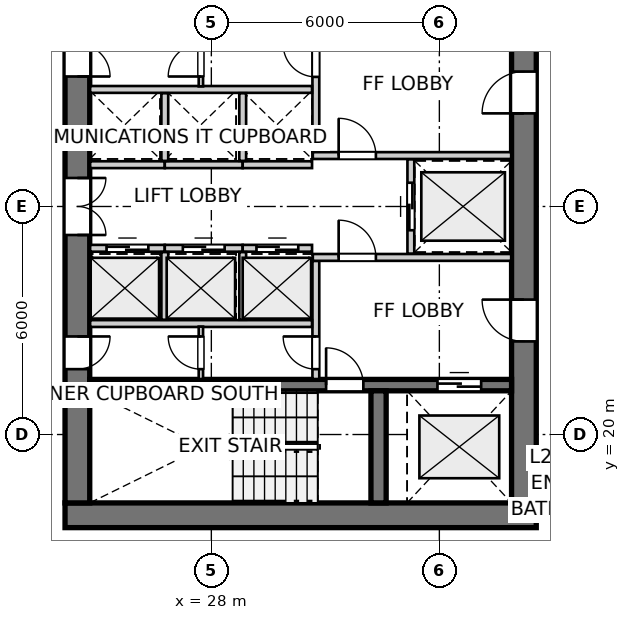
"""IFC4 building model, lengths in metres.
Left out: names, types, materials, properties, quantities, classifications, styles, units other than length and angle.
Written with IfcOpenShell. Run it as: python <this file> out.ifc"""

import sys

from ifc_helpers import new_model, si_unit, direction, frame, frame_2d, origin, place, context, subcontext, project, spatial, rectangle, extrude, source, transform, mapped, element, fill, save


model = new_model("IFC4")
c1 = context("Model", 3, precision=1e-05, world=origin(), true_north=direction((0.0, 1.0)))
c2 = subcontext(c1, "Body", "Model", "MODEL_VIEW")
j1 = project(units=[si_unit("LENGTHUNIT", "METRE"), si_unit("PLANEANGLEUNIT", "RADIAN")], contexts=[c1])
p1 = place(None, origin())
s1 = spatial("IfcSite", under=j1, at=p1, CompositionType="ELEMENT")
p2 = place(p1, origin())
s2 = spatial("IfcBuilding", under=s1, at=p2, CompositionType="ELEMENT")
p3 = place(p2, frame((0.0, 0.0, 80.0)))
s3 = spatial("IfcBuildingStorey", under=s2, at=p3, CompositionType="ELEMENT", Elevation=80.0)
p4 = place(p3, frame((24.15, 17.875, 0.0), z_axis=(0.0, 0.0, 1.0), x_axis=(1.0, 0.0, 0.0)))
e1 = element("IfcWall", 1, at=p4, inside=s3, PredefinedType="SHEAR", context=c2, shape_type="SweptSolid", body=[
    extrude(rectangle(XDim=12.4, YDim=0.65, at=frame_2d((6.2, 0.0))), origin(), (0.0, 0.0, 1.0), 2.935),
])
p5 = place(p3, frame((24.475, 33.8, 0.0), z_axis=(0.0, 0.0, 1.0), x_axis=(0.0, -1.0, 0.0)))
e2 = element("IfcWall", 2, at=p5, inside=s3, PredefinedType="SHEAR", context=c2, shape_type="SweptSolid", body=[
    extrude(rectangle(XDim=15.6, YDim=0.65, at=frame_2d((7.8, 0.0))), origin(), (0.0, 0.0, 1.0), 2.935),
])
p6 = place(p5, frame((7.05, 0.0, 0.0)))
e3 = element("IfcOpeningElement", 3, at=p6, cuts=e2, PredefinedType="OPENING", context=c2, shape_type="SweptSolid", body=[
    extrude(rectangle(XDim=1.5, YDim=2.15, at=frame_2d((0.75, 1.075))), frame((0.0, 0.335, 0.0), z_axis=(0.0, -1.0, 0.0), x_axis=(1.0, 0.0, 0.0)), (0.0, 0.0, 1.0), 0.67),
])
p7 = place(p5, frame((3.52, 0.0, 0.0)))
e4 = element("IfcOpeningElement", 4, at=p7, cuts=e2, PredefinedType="OPENING", context=c2, shape_type="SweptSolid", body=[
    extrude(rectangle(XDim=0.86, YDim=2.05, at=frame_2d((0.43, 1.025))), frame((0.0, 0.335, 0.0), z_axis=(0.0, -1.0, 0.0), x_axis=(1.0, 0.0, 0.0)), (0.0, 0.0, 1.0), 0.67),
])
p8 = place(p5, frame((11.22, 0.0, 0.0)))
e5 = element("IfcOpeningElement", 5, at=p8, cuts=e2, PredefinedType="OPENING", context=c2, shape_type="SweptSolid", body=[
    extrude(rectangle(XDim=0.86, YDim=2.05, at=frame_2d((0.43, 1.025))), frame((0.0, 0.335, 0.0), z_axis=(0.0, -1.0, 0.0), x_axis=(1.0, 0.0, 0.0)), (0.0, 0.0, 1.0), 0.67),
])
p9 = place(p3, frame((36.225, 18.2, 0.0), z_axis=(0.0, 0.0, 1.0), x_axis=(0.0, 1.0, 0.0)))
e6 = element("IfcWall", 6, at=p9, inside=s3, PredefinedType="SHEAR", context=c2, shape_type="SweptSolid", body=[
    extrude(rectangle(XDim=15.6, YDim=0.65, at=frame_2d((7.8, 0.0))), origin(), (0.0, 0.0, 1.0), 2.935),
])
p10 = place(p9, frame((4.25, 0.0, 0.0)))
e7 = element("IfcOpeningElement", 7, at=p10, cuts=e6, PredefinedType="OPENING", context=c2, shape_type="SweptSolid", body=[
    extrude(rectangle(XDim=1.1, YDim=2.15, at=frame_2d((0.55, 1.075))), frame((0.0, 0.335, 0.0), z_axis=(0.0, -1.0, 0.0), x_axis=(1.0, 0.0, 0.0)), (0.0, 0.0, 1.0), 0.67),
])
p11 = place(p9, frame((10.25, 0.0, 0.0)))
e8 = element("IfcOpeningElement", 8, at=p11, cuts=e6, PredefinedType="OPENING", context=c2, shape_type="SweptSolid", body=[
    extrude(rectangle(XDim=1.1, YDim=2.15, at=frame_2d((0.55, 1.075))), frame((0.0, 0.335, 0.0), z_axis=(0.0, -1.0, 0.0), x_axis=(1.0, 0.0, 0.0)), (0.0, 0.0, 1.0), 0.67),
])
p12 = place(p3, frame((24.8, 21.3, 0.0), z_axis=(0.0, 0.0, 1.0), x_axis=(1.0, 0.0, 0.0)))
e9 = element("IfcWall", 9, at=p12, inside=s3, PredefinedType="SHEAR", context=c2, shape_type="SweptSolid", body=[
    extrude(rectangle(XDim=11.1, YDim=0.3, at=frame_2d((5.55, 0.0))), origin(), (0.0, 0.0, 1.0), 2.935),
])
p13 = place(p12, frame((6.22, 0.0, 0.0)))
e10 = element("IfcOpeningElement", 10, at=p13, cuts=e9, PredefinedType="OPENING", context=c2, shape_type="SweptSolid", body=[
    extrude(rectangle(XDim=0.98, YDim=2.15, at=frame_2d((0.49, 1.075))), frame((0.0, 0.16, 0.0), z_axis=(0.0, -1.0, 0.0), x_axis=(1.0, 0.0, 0.0)), (0.0, 0.0, 1.0), 0.32),
])
p14 = place(p12, frame((9.15, 0.0, 0.0)))
e11 = element("IfcOpeningElement", 11, at=p14, cuts=e9, PredefinedType="OPENING", context=c2, shape_type="SweptSolid", body=[
    extrude(rectangle(XDim=1.15, YDim=2.15, at=frame_2d((0.575, 1.075))), frame((0.0, 0.16, 0.0), z_axis=(0.0, -1.0, 0.0), x_axis=(1.0, 0.0, 0.0)), (0.0, 0.0, 1.0), 0.32),
])
p15 = place(p3, frame((32.4, 18.2, 0.0), z_axis=(0.0, 0.0, 1.0), x_axis=(0.0, 1.0, 0.0)))
e12 = element("IfcWall", 12, at=p15, inside=s3, PredefinedType="SHEAR", context=c2, shape_type="SweptSolid", body=[
    extrude(rectangle(XDim=2.95, YDim=0.4, at=frame_2d((1.475, 0.0))), origin(), (0.0, 0.0, 1.0), 2.935),
])
p16 = place(p3, frame((30.75, 21.46, 0.0), z_axis=(0.0, 0.0, 1.0), x_axis=(0.0, 1.0, 0.0)))
e13 = element("IfcWall", 13, at=p16, inside=s3, PredefinedType="PARTITIONING", context=c2, shape_type="SweptSolid", body=[
    extrude(rectangle(XDim=3.11, YDim=0.18, at=frame_2d((1.555, 0.0))), origin(), (0.0, 0.0, 1.0), 2.935),
])
p17 = place(p16, frame((0.26, 0.0, 0.0)))
e14 = element("IfcOpeningElement", 14, at=p17, cuts=e13, PredefinedType="OPENING", context=c2, shape_type="SweptSolid", body=[
    extrude(rectangle(XDim=0.86, YDim=2.05, at=frame_2d((0.43, 1.025))), frame((0.0, 0.1, 0.0), z_axis=(0.0, -1.0, 0.0), x_axis=(1.0, 0.0, 0.0)), (0.0, 0.0, 1.0), 0.2),
])
p18 = place(p3, frame((30.67, 24.66, 0.0), z_axis=(0.0, 0.0, 1.0), x_axis=(1.0, 0.0, 0.0)))
e15 = element("IfcWall", 15, at=p18, inside=s3, PredefinedType="PARTITIONING", context=c2, shape_type="SweptSolid", body=[
    extrude(rectangle(XDim=5.22, YDim=0.18, at=frame_2d((2.61, 0.0))), origin(), (0.0, 0.0, 1.0), 2.935),
])
p19 = place(p18, frame((0.68, 0.0, 0.0)))
e16 = element("IfcOpeningElement", 16, at=p19, cuts=e15, PredefinedType="OPENING", context=c2, shape_type="SweptSolid", body=[
    extrude(rectangle(XDim=0.98, YDim=2.15, at=frame_2d((0.49, 1.075))), frame((0.0, 0.1, 0.0), z_axis=(0.0, -1.0, 0.0), x_axis=(1.0, 0.0, 0.0)), (0.0, 0.0, 1.0), 0.2),
])
p20 = place(p3, frame((30.75, 27.43, 0.0), z_axis=(0.0, 0.0, 1.0), x_axis=(0.0, 1.0, 0.0)))
e17 = element("IfcWall", 17, at=p20, inside=s3, PredefinedType="PARTITIONING", context=c2, shape_type="SweptSolid", body=[
    extrude(rectangle(XDim=3.11, YDim=0.18, at=frame_2d((1.555, 0.0))), origin(), (0.0, 0.0, 1.0), 2.935),
])
p21 = place(p20, frame((1.98, 0.0, 0.0)))
e18 = element("IfcOpeningElement", 18, at=p21, cuts=e17, PredefinedType="OPENING", context=c2, shape_type="SweptSolid", body=[
    extrude(rectangle(XDim=0.86, YDim=2.05, at=frame_2d((0.43, 1.025))), frame((0.0, 0.1, 0.0), z_axis=(0.0, -1.0, 0.0), x_axis=(1.0, 0.0, 0.0)), (0.0, 0.0, 1.0), 0.2),
])
p22 = place(p3, frame((30.67, 27.34, 0.0), z_axis=(0.0, 0.0, 1.0), x_axis=(1.0, 0.0, 0.0)))
e19 = element("IfcWall", 19, at=p22, inside=s3, PredefinedType="PARTITIONING", context=c2, shape_type="SweptSolid", body=[
    extrude(rectangle(XDim=5.22, YDim=0.18, at=frame_2d((2.61, 0.0))), origin(), (0.0, 0.0, 1.0), 2.935),
])
p23 = place(p22, frame((0.68, 0.0, 0.0)))
e20 = element("IfcOpeningElement", 20, at=p23, cuts=e19, PredefinedType="OPENING", context=c2, shape_type="SweptSolid", body=[
    extrude(rectangle(XDim=0.98, YDim=2.15, at=frame_2d((0.49, 1.075))), frame((0.0, 0.1, 0.0), z_axis=(0.0, -1.0, 0.0), x_axis=(1.0, 0.0, 0.0)), (0.0, 0.0, 1.0), 0.2),
])
p24 = place(p3, frame((33.25, 24.76, 0.0), z_axis=(0.0, 0.0, 1.0), x_axis=(0.0, 1.0, 0.0)))
e21 = element("IfcWall", 21, at=p24, inside=s3, PredefinedType="PARTITIONING", context=c2, shape_type="SweptSolid", body=[
    extrude(rectangle(XDim=2.48, YDim=0.18, at=frame_2d((1.24, 0.0))), origin(), (0.0, 0.0, 1.0), 2.935),
])
p25 = place(p24, frame((0.615, 0.0, 0.0)))
e22 = element("IfcOpeningElement", 22, at=p25, cuts=e21, PredefinedType="OPENING", context=c2, shape_type="SweptSolid", body=[
    extrude(rectangle(XDim=1.25, YDim=2.15, at=frame_2d((0.625, 1.075))), frame((0.0, 0.1, 0.0), z_axis=(0.0, -1.0, 0.0), x_axis=(1.0, 0.0, 0.0)), (0.0, 0.0, 1.0), 0.2),
])
p26 = place(p3, frame((24.81, 22.92, 0.0), z_axis=(0.0, 0.0, 1.0), x_axis=(1.0, 0.0, 0.0)))
e23 = element("IfcWall", 23, at=p26, inside=s3, PredefinedType="PARTITIONING", context=c2, shape_type="SweptSolid", body=[
    extrude(rectangle(XDim=5.84, YDim=0.18, at=frame_2d((2.92, 0.0))), origin(), (0.0, 0.0, 1.0), 2.935),
])
p27 = place(p3, frame((24.81, 24.9, 0.0), z_axis=(0.0, 0.0, 1.0), x_axis=(1.0, 0.0, 0.0)))
e24 = element("IfcWall", 24, at=p27, inside=s3, PredefinedType="PARTITIONING", context=c2, shape_type="SweptSolid", body=[
    extrude(rectangle(XDim=1.965, YDim=0.18, at=frame_2d((0.982, 0.0))), origin(), (0.0, 0.0, 1.0), 2.935),
])
p28 = place(p27, frame((0.433, 0.0, 0.0)))
e25 = element("IfcOpeningElement", 25, at=p28, cuts=e24, PredefinedType="OPENING", context=c2, shape_type="SweptSolid", body=[
    extrude(rectangle(XDim=1.1, YDim=2.15, at=frame_2d((0.55, 1.075))), frame((0.0, 0.1, 0.0), z_axis=(0.0, -1.0, 0.0), x_axis=(1.0, 0.0, 0.0)), (0.0, 0.0, 1.0), 0.2),
])
p29 = place(p3, frame((26.775, 24.9, 0.0), z_axis=(0.0, 0.0, 1.0), x_axis=(1.0, 0.0, 0.0)))
e26 = element("IfcWall", 26, at=p29, inside=s3, PredefinedType="PARTITIONING", context=c2, shape_type="SweptSolid", body=[
    extrude(rectangle(XDim=2.05, YDim=0.18, at=frame_2d((1.025, 0.0))), origin(), (0.0, 0.0, 1.0), 2.935),
])
p30 = place(p29, frame((0.475, 0.0, 0.0)))
e27 = element("IfcOpeningElement", 27, at=p30, cuts=e26, PredefinedType="OPENING", context=c2, shape_type="SweptSolid", body=[
    extrude(rectangle(XDim=1.1, YDim=2.15, at=frame_2d((0.55, 1.075))), frame((0.0, 0.1, 0.0), z_axis=(0.0, -1.0, 0.0), x_axis=(1.0, 0.0, 0.0)), (0.0, 0.0, 1.0), 0.2),
])
p31 = place(p3, frame((26.775, 23.02, 0.0), z_axis=(0.0, 0.0, 1.0), x_axis=(0.0, 1.0, 0.0)))
e28 = element("IfcWall", 28, at=p31, inside=s3, PredefinedType="PARTITIONING", context=c2, shape_type="SweptSolid", body=[
    extrude(rectangle(XDim=1.78, YDim=0.18, at=frame_2d((0.89, 0.0))), origin(), (0.0, 0.0, 1.0), 2.935),
])
p32 = place(p3, frame((28.825, 24.9, 0.0), z_axis=(0.0, 0.0, 1.0), x_axis=(1.0, 0.0, 0.0)))
e29 = element("IfcWall", 29, at=p32, inside=s3, PredefinedType="PARTITIONING", context=c2, shape_type="SweptSolid", body=[
    extrude(rectangle(XDim=1.825, YDim=0.18, at=frame_2d((0.913, 0.0))), origin(), (0.0, 0.0, 1.0), 2.935),
])
p33 = place(p32, frame((0.363, 0.0, 0.0)))
e30 = element("IfcOpeningElement", 30, at=p33, cuts=e29, PredefinedType="OPENING", context=c2, shape_type="SweptSolid", body=[
    extrude(rectangle(XDim=1.1, YDim=2.15, at=frame_2d((0.55, 1.075))), frame((0.0, 0.1, 0.0), z_axis=(0.0, -1.0, 0.0), x_axis=(1.0, 0.0, 0.0)), (0.0, 0.0, 1.0), 0.2),
])
p34 = place(p3, frame((28.825, 23.02, 0.0), z_axis=(0.0, 0.0, 1.0), x_axis=(0.0, 1.0, 0.0)))
e31 = element("IfcWall", 31, at=p34, inside=s3, PredefinedType="PARTITIONING", context=c2, shape_type="SweptSolid", body=[
    extrude(rectangle(XDim=1.78, YDim=0.18, at=frame_2d((0.89, 0.0))), origin(), (0.0, 0.0, 1.0), 2.935),
])
p35 = place(p3, frame((24.81, 29.08, 0.0), z_axis=(0.0, 0.0, 1.0), x_axis=(1.0, 0.0, 0.0)))
e32 = element("IfcWall", 32, at=p35, inside=s3, PredefinedType="PARTITIONING", context=c2, shape_type="SweptSolid", body=[
    extrude(rectangle(XDim=5.84, YDim=0.18, at=frame_2d((2.92, 0.0))), origin(), (0.0, 0.0, 1.0), 2.935),
])
p36 = place(p3, frame((24.81, 27.1, 0.0), z_axis=(0.0, 0.0, 1.0), x_axis=(1.0, 0.0, 0.0)))
e33 = element("IfcWall", 33, at=p36, inside=s3, PredefinedType="PARTITIONING", context=c2, shape_type="SweptSolid", body=[
    extrude(rectangle(XDim=1.965, YDim=0.18, at=frame_2d((0.982, 0.0))), origin(), (0.0, 0.0, 1.0), 2.935),
])
p37 = place(p3, frame((26.775, 27.1, 0.0), z_axis=(0.0, 0.0, 1.0), x_axis=(1.0, 0.0, 0.0)))
e34 = element("IfcWall", 34, at=p37, inside=s3, PredefinedType="PARTITIONING", context=c2, shape_type="SweptSolid", body=[
    extrude(rectangle(XDim=2.05, YDim=0.18, at=frame_2d((1.025, 0.0))), origin(), (0.0, 0.0, 1.0), 2.935),
])
p38 = place(p3, frame((26.775, 27.2, 0.0), z_axis=(0.0, 0.0, 1.0), x_axis=(0.0, 1.0, 0.0)))
e35 = element("IfcWall", 35, at=p38, inside=s3, PredefinedType="PARTITIONING", context=c2, shape_type="SweptSolid", body=[
    extrude(rectangle(XDim=1.78, YDim=0.18, at=frame_2d((0.89, 0.0))), origin(), (0.0, 0.0, 1.0), 2.935),
])
p39 = place(p3, frame((28.825, 27.1, 0.0), z_axis=(0.0, 0.0, 1.0), x_axis=(1.0, 0.0, 0.0)))
e36 = element("IfcWall", 36, at=p39, inside=s3, PredefinedType="PARTITIONING", context=c2, shape_type="SweptSolid", body=[
    extrude(rectangle(XDim=1.825, YDim=0.18, at=frame_2d((0.913, 0.0))), origin(), (0.0, 0.0, 1.0), 2.935),
])
p40 = place(p3, frame((28.825, 27.2, 0.0), z_axis=(0.0, 0.0, 1.0), x_axis=(0.0, 1.0, 0.0)))
e37 = element("IfcWall", 37, at=p40, inside=s3, PredefinedType="PARTITIONING", context=c2, shape_type="SweptSolid", body=[
    extrude(rectangle(XDim=1.78, YDim=0.18, at=frame_2d((0.89, 0.0))), origin(), (0.0, 0.0, 1.0), 2.935),
])
p41 = place(p3, frame((27.725, 21.46, 0.0), z_axis=(0.0, 0.0, 1.0), x_axis=(0.0, 1.0, 0.0)))
e38 = element("IfcWall", 38, at=p41, inside=s3, PredefinedType="PARTITIONING", context=c2, shape_type="SweptSolid", body=[
    extrude(rectangle(XDim=1.38, YDim=0.115, at=frame_2d((0.69, 0.0))), origin(), (0.0, 0.0, 1.0), 2.935),
])
p42 = place(p41, frame((0.26, 0.0, 0.0)))
e39 = element("IfcOpeningElement", 39, at=p42, cuts=e38, PredefinedType="OPENING", context=c2, shape_type="SweptSolid", body=[
    extrude(rectangle(XDim=0.86, YDim=2.05, at=frame_2d((0.43, 1.025))), frame((0.0, 0.067, 0.0), z_axis=(0.0, -1.0, 0.0), x_axis=(1.0, 0.0, 0.0)), (0.0, 0.0, 1.0), 0.135),
])
p43 = place(p3, frame((27.725, 29.16, 0.0), z_axis=(0.0, 0.0, 1.0), x_axis=(0.0, 1.0, 0.0)))
e40 = element("IfcWall", 40, at=p43, inside=s3, PredefinedType="PARTITIONING", context=c2, shape_type="SweptSolid", body=[
    extrude(rectangle(XDim=1.38, YDim=0.115, at=frame_2d((0.69, 0.0))), origin(), (0.0, 0.0, 1.0), 2.935),
])
p44 = place(p43, frame((0.26, 0.0, 0.0)))
e41 = element("IfcOpeningElement", 41, at=p44, cuts=e40, PredefinedType="OPENING", context=c2, shape_type="SweptSolid", body=[
    extrude(rectangle(XDim=0.86, YDim=2.05, at=frame_2d((0.43, 1.025))), frame((0.0, 0.067, 0.0), z_axis=(0.0, -1.0, 0.0), x_axis=(1.0, 0.0, 0.0)), (0.0, 0.0, 1.0), 0.135),
])
m1 = source(origin(), c2, "Body", "SweptSolid", [
    extrude(rectangle(XDim=0.98, YDim=2.15, at=frame_2d((0.49, 1.075))), frame((0.0, 0.025, 0.0), z_axis=(0.0, -1.0, 0.0), x_axis=(1.0, 0.0, 0.0)), (0.0, 0.0, 1.0), 0.05),
])
p45 = place(p13, origin())
e42 = element("IfcDoor", 42, at=p45, inside=s3, OperationType="SINGLE_SWING_LEFT", PredefinedType="DOOR", context=c2, shape_type="MappedRepresentation", body=[
    mapped(m1, transform((0.0, 0.0, 0.0), x_axis=(1.0, 0.0, 0.0), y_axis=(0.0, 1.0, 0.0), z_axis=(0.0, 0.0, 1.0), scale=1.0)),
])
fill(e10, e42)
m2 = source(origin(), c2, "Body", "SweptSolid", [
    extrude(rectangle(XDim=1.15, YDim=2.15, at=frame_2d((0.575, 1.075))), frame((0.0, 0.025, 0.0), z_axis=(0.0, -1.0, 0.0), x_axis=(1.0, 0.0, 0.0)), (0.0, 0.0, 1.0), 0.05),
])
p46 = place(p14, origin())
e43 = element("IfcDoor", 43, at=p46, inside=s3, OperationType="DOUBLE_DOOR_SLIDING", PredefinedType="DOOR", context=c2, shape_type="MappedRepresentation", body=[
    mapped(m2, transform((0.0, 0.0, 0.0), x_axis=(1.0, 0.0, 0.0), y_axis=(0.0, 1.0, 0.0), z_axis=(0.0, 0.0, 1.0), scale=1.0)),
])
fill(e11, e43)
m3 = source(origin(), c2, "Body", "SweptSolid", [
    extrude(rectangle(XDim=1.1, YDim=2.15, at=frame_2d((0.55, 1.075))), frame((0.0, 0.025, 0.0), z_axis=(0.0, -1.0, 0.0), x_axis=(1.0, 0.0, 0.0)), (0.0, 0.0, 1.0), 0.05),
])
p47 = place(p10, origin())
e44 = element("IfcDoor", 44, at=p47, inside=s3, OperationType="SINGLE_SWING_RIGHT", PredefinedType="DOOR", context=c2, shape_type="MappedRepresentation", body=[
    mapped(m3, transform((0.0, 0.0, 0.0), x_axis=(1.0, 0.0, 0.0), y_axis=(0.0, 1.0, 0.0), z_axis=(0.0, 0.0, 1.0), scale=1.0)),
])
fill(e7, e44)
p48 = place(p11, origin())
e45 = element("IfcDoor", 45, at=p48, inside=s3, OperationType="SINGLE_SWING_LEFT", PredefinedType="DOOR", context=c2, shape_type="MappedRepresentation", body=[
    mapped(m3, transform((0.0, 0.0, 0.0), x_axis=(1.0, 0.0, 0.0), y_axis=(0.0, 1.0, 0.0), z_axis=(0.0, 0.0, 1.0), scale=1.0)),
])
fill(e8, e45)
m4 = source(origin(), c2, "Body", "SweptSolid", [
    extrude(rectangle(XDim=1.5, YDim=2.15, at=frame_2d((0.75, 1.075))), frame((0.0, 0.025, 0.0), z_axis=(0.0, -1.0, 0.0), x_axis=(1.0, 0.0, 0.0)), (0.0, 0.0, 1.0), 0.05),
])
p49 = place(p6, origin())
e46 = element("IfcDoor", 46, at=p49, inside=s3, OperationType="DOUBLE_DOOR_SINGLE_SWING", PredefinedType="DOOR", context=c2, shape_type="MappedRepresentation", body=[
    mapped(m4, transform((0.0, 0.0, 0.0), x_axis=(1.0, 0.0, 0.0), y_axis=(0.0, 1.0, 0.0), z_axis=(0.0, 0.0, 1.0), scale=1.0)),
])
fill(e3, e46)
m5 = source(origin(), c2, "Body", "SweptSolid", [
    extrude(rectangle(XDim=0.86, YDim=2.05, at=frame_2d((0.43, 1.025))), frame((0.0, 0.025, 0.0), z_axis=(0.0, -1.0, 0.0), x_axis=(1.0, 0.0, 0.0)), (0.0, 0.0, 1.0), 0.05),
])
p50 = place(p7, origin())
e47 = element("IfcDoor", 47, at=p50, inside=s3, OperationType="SINGLE_SWING_RIGHT", PredefinedType="DOOR", context=c2, shape_type="MappedRepresentation", body=[
    mapped(m5, transform((0.0, 0.0, 0.0), x_axis=(1.0, 0.0, 0.0), y_axis=(0.0, 1.0, 0.0), z_axis=(0.0, 0.0, 1.0), scale=1.0)),
])
fill(e4, e47)
p51 = place(p8, origin())
e48 = element("IfcDoor", 48, at=p51, inside=s3, OperationType="SINGLE_SWING_LEFT", PredefinedType="DOOR", context=c2, shape_type="MappedRepresentation", body=[
    mapped(m5, transform((0.0, 0.0, 0.0), x_axis=(1.0, 0.0, 0.0), y_axis=(0.0, 1.0, 0.0), z_axis=(0.0, 0.0, 1.0), scale=1.0)),
])
fill(e5, e48)
p52 = place(p17, origin())
e49 = element("IfcDoor", 49, at=p52, inside=s3, OperationType="SINGLE_SWING_RIGHT", PredefinedType="DOOR", context=c2, shape_type="MappedRepresentation", body=[
    mapped(m5, transform((0.0, 0.0, 0.0), x_axis=(1.0, 0.0, 0.0), y_axis=(0.0, 1.0, 0.0), z_axis=(0.0, 0.0, 1.0), scale=1.0)),
])
fill(e14, e49)
p53 = place(p19, origin())
e50 = element("IfcDoor", 50, at=p53, inside=s3, OperationType="SINGLE_SWING_LEFT", PredefinedType="DOOR", context=c2, shape_type="MappedRepresentation", body=[
    mapped(m1, transform((0.0, 0.0, 0.0), x_axis=(1.0, 0.0, 0.0), y_axis=(0.0, 1.0, 0.0), z_axis=(0.0, 0.0, 1.0), scale=1.0)),
])
fill(e16, e50)
p54 = place(p21, origin())
e51 = element("IfcDoor", 51, at=p54, inside=s3, OperationType="SINGLE_SWING_RIGHT", PredefinedType="DOOR", context=c2, shape_type="MappedRepresentation", body=[
    mapped(m5, transform((0.0, 0.0, 0.0), x_axis=(1.0, 0.0, 0.0), y_axis=(0.0, 1.0, 0.0), z_axis=(0.0, 0.0, 1.0), scale=1.0)),
])
fill(e18, e51)
p55 = place(p23, origin())
e52 = element("IfcDoor", 52, at=p55, inside=s3, OperationType="SINGLE_SWING_LEFT", PredefinedType="DOOR", context=c2, shape_type="MappedRepresentation", body=[
    mapped(m1, transform((0.0, 0.0, 0.0), x_axis=(1.0, 0.0, 0.0), y_axis=(0.0, 1.0, 0.0), z_axis=(0.0, 0.0, 1.0), scale=1.0)),
])
fill(e20, e52)
m6 = source(origin(), c2, "Body", "SweptSolid", [
    extrude(rectangle(XDim=1.25, YDim=2.15, at=frame_2d((0.625, 1.075))), frame((0.0, 0.025, 0.0), z_axis=(0.0, -1.0, 0.0), x_axis=(1.0, 0.0, 0.0)), (0.0, 0.0, 1.0), 0.05),
])
p56 = place(p25, origin())
e53 = element("IfcDoor", 53, at=p56, inside=s3, OperationType="DOUBLE_DOOR_SLIDING", PredefinedType="DOOR", context=c2, shape_type="MappedRepresentation", body=[
    mapped(m6, transform((0.0, 0.0, 0.0), x_axis=(1.0, 0.0, 0.0), y_axis=(0.0, 1.0, 0.0), z_axis=(0.0, 0.0, 1.0), scale=1.0)),
])
fill(e22, e53)
p57 = place(p28, origin())
e54 = element("IfcDoor", 54, at=p57, inside=s3, OperationType="DOUBLE_DOOR_SLIDING", PredefinedType="DOOR", context=c2, shape_type="MappedRepresentation", body=[
    mapped(m3, transform((0.0, 0.0, 0.0), x_axis=(1.0, 0.0, 0.0), y_axis=(0.0, 1.0, 0.0), z_axis=(0.0, 0.0, 1.0), scale=1.0)),
])
fill(e25, e54)
p58 = place(p30, origin())
e55 = element("IfcDoor", 55, at=p58, inside=s3, OperationType="DOUBLE_DOOR_SLIDING", PredefinedType="DOOR", context=c2, shape_type="MappedRepresentation", body=[
    mapped(m3, transform((0.0, 0.0, 0.0), x_axis=(1.0, 0.0, 0.0), y_axis=(0.0, 1.0, 0.0), z_axis=(0.0, 0.0, 1.0), scale=1.0)),
])
fill(e27, e55)
p59 = place(p33, origin())
e56 = element("IfcDoor", 56, at=p59, inside=s3, OperationType="DOUBLE_DOOR_SLIDING", PredefinedType="DOOR", context=c2, shape_type="MappedRepresentation", body=[
    mapped(m3, transform((0.0, 0.0, 0.0), x_axis=(1.0, 0.0, 0.0), y_axis=(0.0, 1.0, 0.0), z_axis=(0.0, 0.0, 1.0), scale=1.0)),
])
fill(e30, e56)
p60 = place(p42, origin())
e57 = element("IfcDoor", 57, at=p60, inside=s3, OperationType="SINGLE_SWING_RIGHT", PredefinedType="DOOR", context=c2, shape_type="MappedRepresentation", body=[
    mapped(m5, transform((0.0, 0.0, 0.0), x_axis=(1.0, 0.0, 0.0), y_axis=(0.0, 1.0, 0.0), z_axis=(0.0, 0.0, 1.0), scale=1.0)),
])
fill(e39, e57)
p61 = place(p44, origin())
e58 = element("IfcDoor", 58, at=p61, inside=s3, OperationType="SINGLE_SWING_LEFT", PredefinedType="DOOR", context=c2, shape_type="MappedRepresentation", body=[
    mapped(m5, transform((0.0, 0.0, 0.0), x_axis=(1.0, 0.0, 0.0), y_axis=(0.0, 1.0, 0.0), z_axis=(0.0, 0.0, 1.0), scale=1.0)),
])
fill(e41, e58)
save(model, sys.argv[1])
